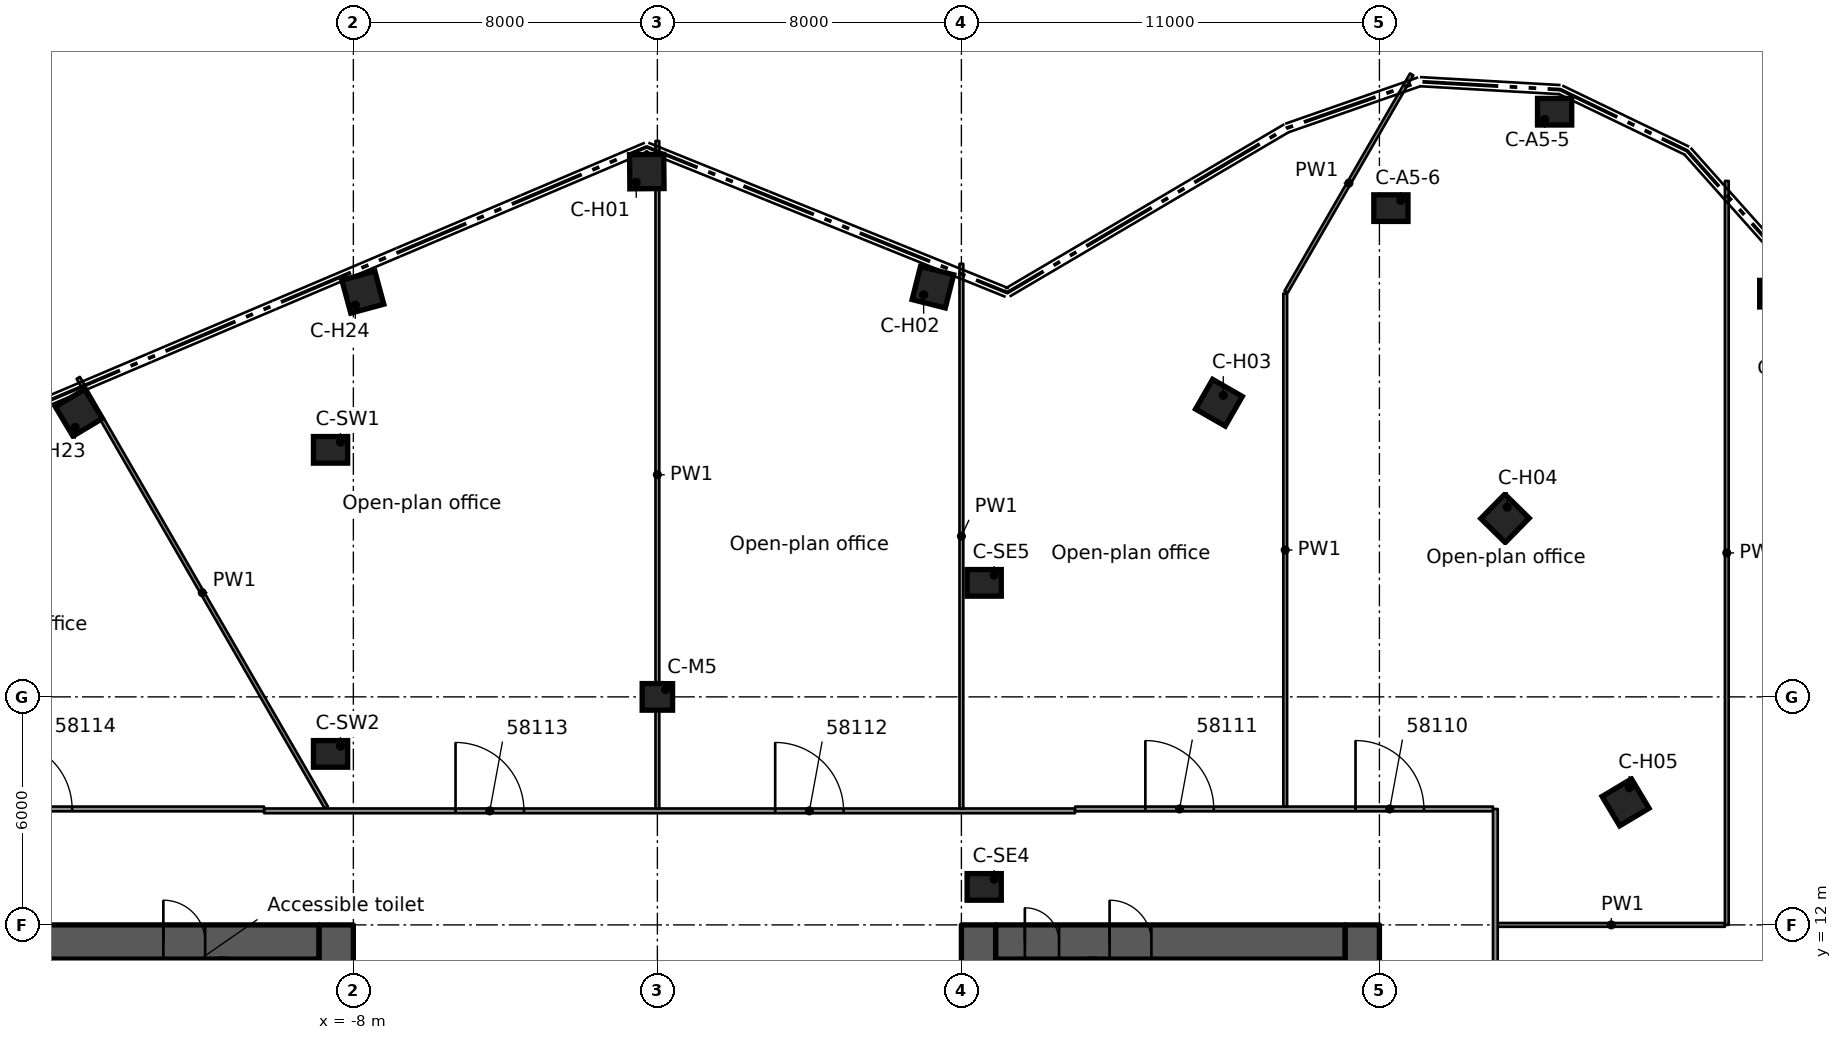
"""IFC4 building model, lengths in metres.
Left out: names, types, materials, properties, quantities, classifications, styles, units other than length and angle.
Written with IfcOpenShell. Run it as: python <this file> out.ifc"""

import sys

from ifc_helpers import new_model, si_unit, direction, frame, frame_2d, origin, origin_2d, place, context, subcontext, project, spatial, rectangle, extrude, element, fill, save


model = new_model("IFC4")
c1 = context("Model", 3, precision=1e-05, world=origin(), true_north=direction((0.0, 1.0)))
c2 = subcontext(c1, "Body", "Model", "MODEL_VIEW")
j1 = project(units=[si_unit("LENGTHUNIT", "METRE"), si_unit("PLANEANGLEUNIT", "RADIAN")], contexts=[c1])
p1 = place(None, origin())
s1 = spatial("IfcSite", under=j1, at=p1, CompositionType="ELEMENT")
p2 = place(p1, origin())
s2 = spatial("IfcBuilding", under=s1, at=p2, CompositionType="ELEMENT")
p3 = place(p2, frame((0.0, 0.0, 285.9)))
s3 = spatial("IfcBuildingStorey", under=s2, at=p3, CompositionType="ELEMENT", Elevation=285.9)
p4 = place(p3, frame((-18.1, 11.55, 0.0), z_axis=(0.0, 0.0, 1.0), x_axis=(1.0, 0.0, 0.0)))
e1 = element("IfcWall", 1, at=p4, inside=s3, PredefinedType="SHEAR", context=c2, shape_type="SweptSolid", body=[
    extrude(rectangle(XDim=9.2, YDim=0.9, at=frame_2d((4.6, 0.0))), origin(), (0.0, 0.0, 1.0), 3.5),
])
p5 = place(p4, frame((5.1, 0.0, 0.0)))
e2 = element("IfcOpeningElement", 2, at=p5, cuts=e1, PredefinedType="OPENING", context=c2, shape_type="SweptSolid", body=[
    extrude(rectangle(XDim=1.1, YDim=2.1, at=frame_2d((0.55, 1.05))), frame((0.0, 0.46, 0.0), z_axis=(0.0, -1.0, 0.0), x_axis=(1.0, 0.0, 0.0)), (0.0, 0.0, 1.0), 0.92),
])
p6 = place(p3, frame((-8.45, -12.0, 0.0), z_axis=(0.0, 0.0, 1.0), x_axis=(0.0, 1.0, 0.0)))
e3 = element("IfcWall", 3, at=p6, inside=s3, PredefinedType="SHEAR", context=c2, shape_type="SweptSolid", body=[
    extrude(rectangle(XDim=24.0, YDim=0.9, at=frame_2d((12.0, 0.0))), origin(), (0.0, 0.0, 1.0), 3.5),
])
p7 = place(p6, frame((9.6, 0.0, 0.0)))
e4 = element("IfcOpeningElement", 4, at=p7, cuts=e3, PredefinedType="OPENING", context=c2, shape_type="SweptSolid", body=[
    extrude(rectangle(XDim=1.8, YDim=2.1, at=frame_2d((0.9, 1.05))), frame((0.0, 0.46, 0.0), z_axis=(0.0, -1.0, 0.0), x_axis=(1.0, 0.0, 0.0)), (0.0, 0.0, 1.0), 0.92),
])
p8 = place(p6, frame((19.65, 0.0, 0.0)))
e5 = element("IfcOpeningElement", 5, at=p8, cuts=e3, PredefinedType="OPENING", context=c2, shape_type="SweptSolid", body=[
    extrude(rectangle(XDim=1.1, YDim=2.1, at=frame_2d((0.55, 1.05))), frame((0.0, 0.46, 0.0), z_axis=(0.0, -1.0, 0.0), x_axis=(1.0, 0.0, 0.0)), (0.0, 0.0, 1.0), 0.92),
])
p9 = place(p3, frame((8.9, 11.55, 0.0), z_axis=(0.0, 0.0, 1.0), x_axis=(1.0, 0.0, 0.0)))
e6 = element("IfcWall", 6, at=p9, inside=s3, PredefinedType="SHEAR", context=c2, shape_type="SweptSolid", body=[
    extrude(rectangle(XDim=9.2, YDim=0.9, at=frame_2d((4.6, 0.0))), origin(), (0.0, 0.0, 1.0), 3.5),
])
p10 = place(p9, frame((3.0, 0.0, 0.0)))
e7 = element("IfcOpeningElement", 7, at=p10, cuts=e6, PredefinedType="OPENING", context=c2, shape_type="SweptSolid", body=[
    extrude(rectangle(XDim=1.1, YDim=2.1, at=frame_2d((0.55, 1.05))), frame((0.0, 0.46, 0.0), z_axis=(0.0, -1.0, 0.0), x_axis=(1.0, 0.0, 0.0)), (0.0, 0.0, 1.0), 0.92),
])
p11 = place(p9, frame((0.77, 0.0, 0.0)))
e8 = element("IfcOpeningElement", 8, at=p11, cuts=e6, PredefinedType="OPENING", context=c2, shape_type="SweptSolid", body=[
    extrude(rectangle(XDim=0.9, YDim=2.1, at=frame_2d((0.45, 1.05))), frame((0.0, 0.46, 0.0), z_axis=(0.0, -1.0, 0.0), x_axis=(1.0, 0.0, 0.0)), (0.0, 0.0, 1.0), 0.92),
])
p12 = place(p3, frame((8.45, -12.0, 0.0), z_axis=(0.0, 0.0, 1.0), x_axis=(0.0, 1.0, 0.0)))
e9 = element("IfcWall", 9, at=p12, inside=s3, PredefinedType="SHEAR", context=c2, shape_type="SweptSolid", body=[
    extrude(rectangle(XDim=24.0, YDim=0.9, at=frame_2d((12.0, 0.0))), origin(), (0.0, 0.0, 1.0), 3.5),
])
p13 = place(p12, frame((12.6, 0.0, 0.0)))
e10 = element("IfcOpeningElement", 10, at=p13, cuts=e9, PredefinedType="OPENING", context=c2, shape_type="SweptSolid", body=[
    extrude(rectangle(XDim=1.8, YDim=2.1, at=frame_2d((0.9, 1.05))), frame((0.0, 0.46, 0.0), z_axis=(0.0, -1.0, 0.0), x_axis=(1.0, 0.0, 0.0)), (0.0, 0.0, 1.0), 0.92),
])
p14 = place(p12, frame((3.25, 0.0, 0.0)))
e11 = element("IfcOpeningElement", 11, at=p14, cuts=e9, PredefinedType="OPENING", context=c2, shape_type="SweptSolid", body=[
    extrude(rectangle(XDim=1.1, YDim=2.1, at=frame_2d((0.55, 1.05))), frame((0.0, 0.46, 0.0), z_axis=(0.0, -1.0, 0.0), x_axis=(1.0, 0.0, 0.0)), (0.0, 0.0, 1.0), 0.92),
])
p15 = place(p3, frame((18.55, -12.0, 0.0), z_axis=(0.0, 0.0, 1.0), x_axis=(0.0, 1.0, 0.0)))
e12 = element("IfcWall", 12, at=p15, inside=s3, PredefinedType="SHEAR", context=c2, shape_type="SweptSolid", body=[
    extrude(rectangle(XDim=24.0, YDim=0.9, at=frame_2d((12.0, 0.0))), origin(), (0.0, 0.0, 1.0), 3.5),
])
p16 = place(p15, frame((12.1, 0.0, 0.0)))
e13 = element("IfcOpeningElement", 13, at=p16, cuts=e12, PredefinedType="OPENING", context=c2, shape_type="SweptSolid", body=[
    extrude(rectangle(XDim=1.8, YDim=2.1, at=frame_2d((0.9, 1.05))), frame((0.0, 0.46, 0.0), z_axis=(0.0, -1.0, 0.0), x_axis=(1.0, 0.0, 0.0)), (0.0, 0.0, 1.0), 0.92),
])
for number, where, z_axis, x_axis in (
    (14, (29.456, 28.609, 0.0), (0.0, 0.0, 1.0), (1.0, 0.0, 0.0)),
    (15, (23.61, 33.397, 0.0), (0.0, 0.0, 1.0), (1.0, 0.0, 0.0)),
    (16, (19.302, 30.86, 0.0), (0.0, 0.0, 1.0), (1.0, 0.0, 0.0)),
):
    element("IfcColumn", number, at=place(p3, frame(where, z_axis=z_axis, x_axis=x_axis)), inside=s3, PredefinedType="COLUMN", context=c2, shape_type="SweptSolid", body=[
        extrude(rectangle(XDim=0.9, YDim=0.7, at=origin_2d()), origin(), (0.0, 0.0, 1.0), 3.5),
    ])
for number, where, z_axis, x_axis in (
    (17, (-0.278, 31.821, 0.0), (0.0, 0.0, 1.0), (-0.009, 1.0, 0.0)),
    (18, (7.25, 28.78, 0.0), (0.0, 0.0, 1.0), (0.244, 0.97, 0.0)),
    (19, (14.777, 25.739, 0.0), (0.0, 0.0, 1.0), (0.498, 0.867, 0.0)),
    (20, (22.305, 22.697, 0.0), (0.0, 0.0, 1.0), (0.701, 0.713, 0.0)),
    (21, (25.477, 15.224, 0.0), (0.0, 0.0, 1.0), (0.858, 0.513, 0.0)),
    (22, (-15.224, 25.477, 0.0), (0.0, 0.0, 1.0), (-0.513, 0.858, 0.0)),
    (23, (-7.751, 28.649, 0.0), (0.0, 0.0, 1.0), (-0.261, 0.965, 0.0)),
):
    element("IfcColumn", number, at=place(p3, frame(where, z_axis=z_axis, x_axis=x_axis)), inside=s3, PredefinedType="COLUMN", context=c2, shape_type="SweptSolid", body=[
        extrude(rectangle(XDim=0.9, YDim=0.9, at=origin_2d()), origin(), (0.0, 0.0, 1.0), 3.5),
    ])
p17 = place(p3, frame((0.0, 18.0, 0.0), z_axis=(0.0, 0.0, 1.0), x_axis=(1.0, 0.0, 0.0)))
e24 = element("IfcColumn", 24, at=p17, inside=s3, PredefinedType="COLUMN", context=c2, shape_type="SweptSolid", body=[
    extrude(rectangle(XDim=0.8, YDim=0.7, at=origin_2d()), origin(), (0.0, 0.0, 1.0), 3.5),
])
for number, where, z_axis, x_axis in (
    (25, (8.6, 13.0, 0.0), (0.0, 0.0, 1.0), (1.0, 0.0, 0.0)),
    (26, (8.6, 21.0, 0.0), (0.0, 0.0, 1.0), (1.0, 0.0, 0.0)),
    (27, (-8.6, 24.5, 0.0), (0.0, 0.0, 1.0), (1.0, 0.0, 0.0)),
    (28, (-8.6, 16.5, 0.0), (0.0, 0.0, 1.0), (1.0, 0.0, 0.0)),
):
    element("IfcColumn", number, at=place(p3, frame(where, z_axis=z_axis, x_axis=x_axis)), inside=s3, PredefinedType="COLUMN", context=c2, shape_type="SweptSolid", body=[
        extrude(rectangle(XDim=0.9, YDim=0.7, at=origin_2d()), origin(), (0.0, 0.0, 1.0), 3.5),
    ])
p18 = place(p3, frame((-11.44, 6.975, 0.0), z_axis=(0.0, 0.0, 1.0), x_axis=(0.0, 1.0, 0.0)))
e29 = element("IfcWall", 29, at=p18, inside=s3, PredefinedType="SOLIDWALL", context=c2, shape_type="SweptSolid", body=[
    extrude(rectangle(XDim=4.125, YDim=0.2, at=frame_2d((2.062, 0.0))), origin(), (0.0, 0.0, 1.0), 3.09),
])
p19 = place(p18, frame((2.1, 0.0, 0.0)))
e30 = element("IfcOpeningElement", 30, at=p19, cuts=e29, PredefinedType="OPENING", context=c2, shape_type="SweptSolid", body=[
    extrude(rectangle(XDim=1.1, YDim=2.1, at=frame_2d((0.55, 1.05))), frame((0.0, 0.11, 0.0), z_axis=(0.0, -1.0, 0.0), x_axis=(1.0, 0.0, 0.0)), (0.0, 0.0, 1.0), 0.22),
])
p20 = place(p3, frame((11.44, 11.1, 0.0), z_axis=(0.0, 0.0, 1.0), x_axis=(0.0, -1.0, 0.0)))
e31 = element("IfcWall", 31, at=p20, inside=s3, PredefinedType="SOLIDWALL", context=c2, shape_type="SweptSolid", body=[
    extrude(rectangle(XDim=4.125, YDim=0.2, at=frame_2d((2.062, 0.0))), origin(), (0.0, 0.0, 1.0), 3.09),
])
p21 = place(p3, frame((-15.239, 26.395, 0.0), z_axis=(0.0, 0.0, 1.0), x_axis=(0.499938284347, -0.866061032401, 0.0)))
e32 = element("IfcWall", 32, at=p21, inside=s3, PredefinedType="PARTITIONING", context=c2, shape_type="SweptSolid", body=[
    extrude(rectangle(XDim=13.056, YDim=0.1, at=frame_2d((6.528, 0.0))), origin(), (0.0, 0.0, 1.0), 3.08),
])
p22 = place(p3, frame((22.113, 12.0, 0.0), z_axis=(0.0, 0.0, 1.0), x_axis=(1.0, 0.0, 0.0)))
e33 = element("IfcWall", 33, at=p22, inside=s3, PredefinedType="PARTITIONING", context=c2, shape_type="SweptSolid", body=[
    extrude(rectangle(XDim=5.978, YDim=0.1, at=frame_2d((2.989, 0.0))), origin(), (0.0, 0.0, 1.0), 3.08),
])
p23 = place(p3, frame((-10.349, 15.001, 0.0), z_axis=(0.0, 0.0, 1.0), x_axis=(1.0, 0.0, 0.0)))
e34 = element("IfcWall", 34, at=p23, inside=s3, PredefinedType="PARTITIONING", context=c2, shape_type="SweptSolid", body=[
    extrude(rectangle(XDim=21.339, YDim=0.125, at=frame_2d((10.669, 0.0))), origin(), (0.0, 0.0, 1.0), 3.08),
])
p24 = place(p23, frame((13.449, 0.0, 0.0)))
e35 = element("IfcOpeningElement", 35, at=p24, cuts=e34, PredefinedType="OPENING", context=c2, shape_type="SweptSolid", body=[
    extrude(rectangle(XDim=1.8, YDim=2.1, at=frame_2d((0.9, 1.05))), frame((0.0, 0.073, 0.0), z_axis=(0.0, -1.0, 0.0), x_axis=(1.0, 0.0, 0.0)), (0.0, 0.0, 1.0), 0.145),
])
p25 = place(p23, frame((5.038, 0.0, 0.0)))
e36 = element("IfcOpeningElement", 36, at=p25, cuts=e34, PredefinedType="OPENING", context=c2, shape_type="SweptSolid", body=[
    extrude(rectangle(XDim=1.8, YDim=2.1, at=frame_2d((0.9, 1.05))), frame((0.0, 0.073, 0.0), z_axis=(0.0, -1.0, 0.0), x_axis=(1.0, 0.0, 0.0)), (0.0, 0.0, 1.0), 0.145),
])
p26 = place(p3, frame((-21.988, 15.051, 0.0), z_axis=(0.0, 0.0, 1.0), x_axis=(1.0, 0.0, 0.0)))
e37 = element("IfcWall", 37, at=p26, inside=s3, PredefinedType="PARTITIONING", context=c2, shape_type="SweptSolid", body=[
    extrude(rectangle(XDim=11.638, YDim=0.125, at=frame_2d((5.819, 0.0))), origin(), (0.0, 0.0, 1.0), 3.08),
])
p27 = place(p26, frame((4.788, 0.0, 0.0)))
e38 = element("IfcOpeningElement", 38, at=p27, cuts=e37, PredefinedType="OPENING", context=c2, shape_type="SweptSolid", body=[
    extrude(rectangle(XDim=1.8, YDim=2.1, at=frame_2d((0.9, 1.05))), frame((0.0, 0.073, 0.0), z_axis=(0.0, -1.0, 0.0), x_axis=(1.0, 0.0, 0.0)), (0.0, 0.0, 1.0), 0.145),
])
p28 = place(p3, frame((10.991, 15.051, 0.0), z_axis=(0.0, 0.0, 1.0), x_axis=(1.0, 0.0, 0.0)))
e39 = element("IfcWall", 39, at=p28, inside=s3, PredefinedType="PARTITIONING", context=c2, shape_type="SweptSolid", body=[
    extrude(rectangle(XDim=10.997, YDim=0.125, at=frame_2d((5.499, 0.0))), origin(), (0.0, 0.0, 1.0), 3.08),
])
p29 = place(p28, frame((7.38, 0.0, 0.0)))
e40 = element("IfcOpeningElement", 40, at=p29, cuts=e39, PredefinedType="OPENING", context=c2, shape_type="SweptSolid", body=[
    extrude(rectangle(XDim=1.8, YDim=2.1, at=frame_2d((0.9, 1.05))), frame((0.0, 0.073, 0.0), z_axis=(0.0, -1.0, 0.0), x_axis=(1.0, 0.0, 0.0)), (0.0, 0.0, 1.0), 0.145),
])
p30 = place(p28, frame((1.85, 0.0, 0.0)))
e41 = element("IfcOpeningElement", 41, at=p30, cuts=e39, PredefinedType="OPENING", context=c2, shape_type="SweptSolid", body=[
    extrude(rectangle(XDim=1.8, YDim=2.1, at=frame_2d((0.9, 1.05))), frame((0.0, 0.073, 0.0), z_axis=(0.0, -1.0, 0.0), x_axis=(1.0, 0.0, 0.0)), (0.0, 0.0, 1.0), 0.145),
])
p31 = place(p3, frame((16.546, 28.657, 0.0), z_axis=(0.0, 0.0, 1.0), x_axis=(0.499962356603, 0.866047136119, 0.0)))
e42 = element("IfcWall", 42, at=p31, inside=s3, PredefinedType="PARTITIONING", context=c2, shape_type="SweptSolid", body=[
    extrude(rectangle(XDim=6.607, YDim=0.1, at=frame_2d((3.303, 0.0))), origin(), (0.0, 0.0, 1.0), 3.08),
])
p32 = place(p3, frame((28.141, 12.0, 0.0), z_axis=(0.0, 0.0, 1.0), x_axis=(0.0, 1.0, 0.0)))
e43 = element("IfcWall", 43, at=p32, inside=s3, PredefinedType="PARTITIONING", context=c2, shape_type="SweptSolid", body=[
    extrude(rectangle(XDim=19.576, YDim=0.1, at=frame_2d((9.788, 0.0))), origin(), (0.0, 0.0, 1.0), 2.445),
])
p33 = place(p3, frame((22.051, 15.05, 0.0), z_axis=(0.0, 0.0, 1.0), x_axis=(0.0, -1.0, 0.0)))
e44 = element("IfcWall", 44, at=p33, inside=s3, PredefinedType="PARTITIONING", context=c2, shape_type="SweptSolid", body=[
    extrude(rectangle(XDim=30.1, YDim=0.125, at=frame_2d((15.05, 0.0))), origin(), (0.0, 0.0, 1.0), 3.08),
])
p34 = place(p33, frame((28.15, 0.0, 0.0)))
e45 = element("IfcOpeningElement", 45, at=p34, cuts=e44, PredefinedType="OPENING", context=c2, shape_type="SweptSolid", body=[
    extrude(rectangle(XDim=0.9, YDim=2.1, at=frame_2d((0.45, 1.05))), frame((0.0, 0.073, 0.0), z_axis=(0.0, -1.0, 0.0), x_axis=(1.0, 0.0, 0.0)), (0.0, 0.0, 1.0), 0.145),
])
p35 = place(p33, frame((20.65, 0.0, 0.0)))
e46 = element("IfcOpeningElement", 46, at=p35, cuts=e44, PredefinedType="OPENING", context=c2, shape_type="SweptSolid", body=[
    extrude(rectangle(XDim=0.9, YDim=2.1, at=frame_2d((0.45, 1.05))), frame((0.0, 0.073, 0.0), z_axis=(0.0, -1.0, 0.0), x_axis=(1.0, 0.0, 0.0)), (0.0, 0.0, 1.0), 0.145),
])
p36 = place(p33, frame((11.4, 0.0, 0.0)))
e47 = element("IfcOpeningElement", 47, at=p36, cuts=e44, PredefinedType="OPENING", context=c2, shape_type="SweptSolid", body=[
    extrude(rectangle(XDim=1.1, YDim=2.1, at=frame_2d((0.55, 1.05))), frame((0.0, 0.073, 0.0), z_axis=(0.0, -1.0, 0.0), x_axis=(1.0, 0.0, 0.0)), (0.0, 0.0, 1.0), 0.145),
])
p37 = place(p33, frame((5.15, 0.0, 0.0)))
e48 = element("IfcOpeningElement", 48, at=p37, cuts=e44, PredefinedType="OPENING", context=c2, shape_type="SweptSolid", body=[
    extrude(rectangle(XDim=1.8, YDim=2.1, at=frame_2d((0.9, 1.05))), frame((0.0, 0.073, 0.0), z_axis=(0.0, -1.0, 0.0), x_axis=(1.0, 0.0, 0.0)), (0.0, 0.0, 1.0), 0.145),
])
p38 = place(p3, frame((16.521, 15.114, 0.0), z_axis=(0.0, 0.0, 1.0), x_axis=(0.0, 1.0, 0.0)))
e49 = element("IfcWall", 49, at=p38, inside=s3, PredefinedType="PARTITIONING", context=c2, shape_type="SweptSolid", body=[
    extrude(rectangle(XDim=13.5, YDim=0.1, at=frame_2d((6.75, 0.0))), origin(), (0.0, 0.0, 1.0), 3.08),
])
p39 = place(p3, frame((8.0, 15.063, 0.0), z_axis=(0.0, 0.0, 1.0), x_axis=(0.0, 1.0, 0.0)))
e50 = element("IfcWall", 50, at=p39, inside=s3, PredefinedType="PARTITIONING", context=c2, shape_type="SweptSolid", body=[
    extrude(rectangle(XDim=14.331, YDim=0.1, at=frame_2d((7.166, 0.0))), origin(), (0.0, 0.0, 1.0), 3.08),
])
p40 = place(p3, frame((0.0, 15.063, 0.0), z_axis=(0.0, 0.0, 1.0), x_axis=(0.0, 1.0, 0.0)))
e51 = element("IfcWall", 51, at=p40, inside=s3, PredefinedType="PARTITIONING", context=c2, shape_type="SweptSolid", body=[
    extrude(rectangle(XDim=17.564, YDim=0.1, at=frame_2d((8.782, 0.0))), origin(), (0.0, 0.0, 1.0), 3.08),
])
p41 = place(p5, origin())
e52 = element("IfcDoor", 52, at=p41, inside=s3, OperationType="SINGLE_SWING_RIGHT", PredefinedType="DOOR", context=c2, shape_type="SweptSolid", body=[
    extrude(rectangle(XDim=1.1, YDim=2.1, at=frame_2d((0.55, 1.05))), frame((0.0, 0.025, 0.0), z_axis=(0.0, -1.0, 0.0), x_axis=(1.0, 0.0, 0.0)), (0.0, 0.0, 1.0), 0.05),
])
fill(e2, e52)
p42 = place(p10, origin())
e53 = element("IfcDoor", 53, at=p42, inside=s3, OperationType="SINGLE_SWING_LEFT", PredefinedType="DOOR", context=c2, shape_type="SweptSolid", body=[
    extrude(rectangle(XDim=1.1, YDim=2.1, at=frame_2d((0.55, 1.05))), frame((0.0, 0.025, 0.0), z_axis=(0.0, -1.0, 0.0), x_axis=(1.0, 0.0, 0.0)), (0.0, 0.0, 1.0), 0.05),
])
fill(e7, e53)
p43 = place(p11, origin())
e54 = element("IfcDoor", 54, at=p43, inside=s3, OperationType="SINGLE_SWING_LEFT", PredefinedType="DOOR", context=c2, shape_type="SweptSolid", body=[
    extrude(rectangle(XDim=0.9, YDim=2.1, at=frame_2d((0.45, 1.05))), frame((0.0, 0.025, 0.0), z_axis=(0.0, -1.0, 0.0), x_axis=(1.0, 0.0, 0.0)), (0.0, 0.0, 1.0), 0.05),
])
fill(e8, e54)
p44 = place(p29, origin())
e55 = element("IfcDoor", 55, at=p44, inside=s3, OperationType="DOUBLE_DOOR_SINGLE_SWING", PredefinedType="DOOR", context=c2, shape_type="SweptSolid", body=[
    extrude(rectangle(XDim=1.8, YDim=2.1, at=frame_2d((0.9, 1.05))), frame((0.0, 0.025, 0.0), z_axis=(0.0, -1.0, 0.0), x_axis=(1.0, 0.0, 0.0)), (0.0, 0.0, 1.0), 0.05),
])
fill(e40, e55)
p45 = place(p30, origin())
e56 = element("IfcDoor", 56, at=p45, inside=s3, OperationType="DOUBLE_DOOR_SINGLE_SWING", PredefinedType="DOOR", context=c2, shape_type="SweptSolid", body=[
    extrude(rectangle(XDim=1.8, YDim=2.1, at=frame_2d((0.9, 1.05))), frame((0.0, 0.025, 0.0), z_axis=(0.0, -1.0, 0.0), x_axis=(1.0, 0.0, 0.0)), (0.0, 0.0, 1.0), 0.05),
])
fill(e41, e56)
p46 = place(p24, origin())
e57 = element("IfcDoor", 57, at=p46, inside=s3, OperationType="DOUBLE_DOOR_SINGLE_SWING", PredefinedType="DOOR", context=c2, shape_type="SweptSolid", body=[
    extrude(rectangle(XDim=1.8, YDim=2.1, at=frame_2d((0.9, 1.05))), frame((0.0, 0.025, 0.0), z_axis=(0.0, -1.0, 0.0), x_axis=(1.0, 0.0, 0.0)), (0.0, 0.0, 1.0), 0.05),
])
fill(e35, e57)
p47 = place(p25, origin())
e58 = element("IfcDoor", 58, at=p47, inside=s3, OperationType="DOUBLE_DOOR_SINGLE_SWING", PredefinedType="DOOR", context=c2, shape_type="SweptSolid", body=[
    extrude(rectangle(XDim=1.8, YDim=2.1, at=frame_2d((0.9, 1.05))), frame((0.0, 0.025, 0.0), z_axis=(0.0, -1.0, 0.0), x_axis=(1.0, 0.0, 0.0)), (0.0, 0.0, 1.0), 0.05),
])
fill(e36, e58)
p48 = place(p27, origin())
e59 = element("IfcDoor", 59, at=p48, inside=s3, OperationType="DOUBLE_DOOR_SINGLE_SWING", PredefinedType="DOOR", context=c2, shape_type="SweptSolid", body=[
    extrude(rectangle(XDim=1.8, YDim=2.1, at=frame_2d((0.9, 1.05))), frame((0.0, 0.025, 0.0), z_axis=(0.0, -1.0, 0.0), x_axis=(1.0, 0.0, 0.0)), (0.0, 0.0, 1.0), 0.05),
])
fill(e38, e59)
save(model, sys.argv[1])
